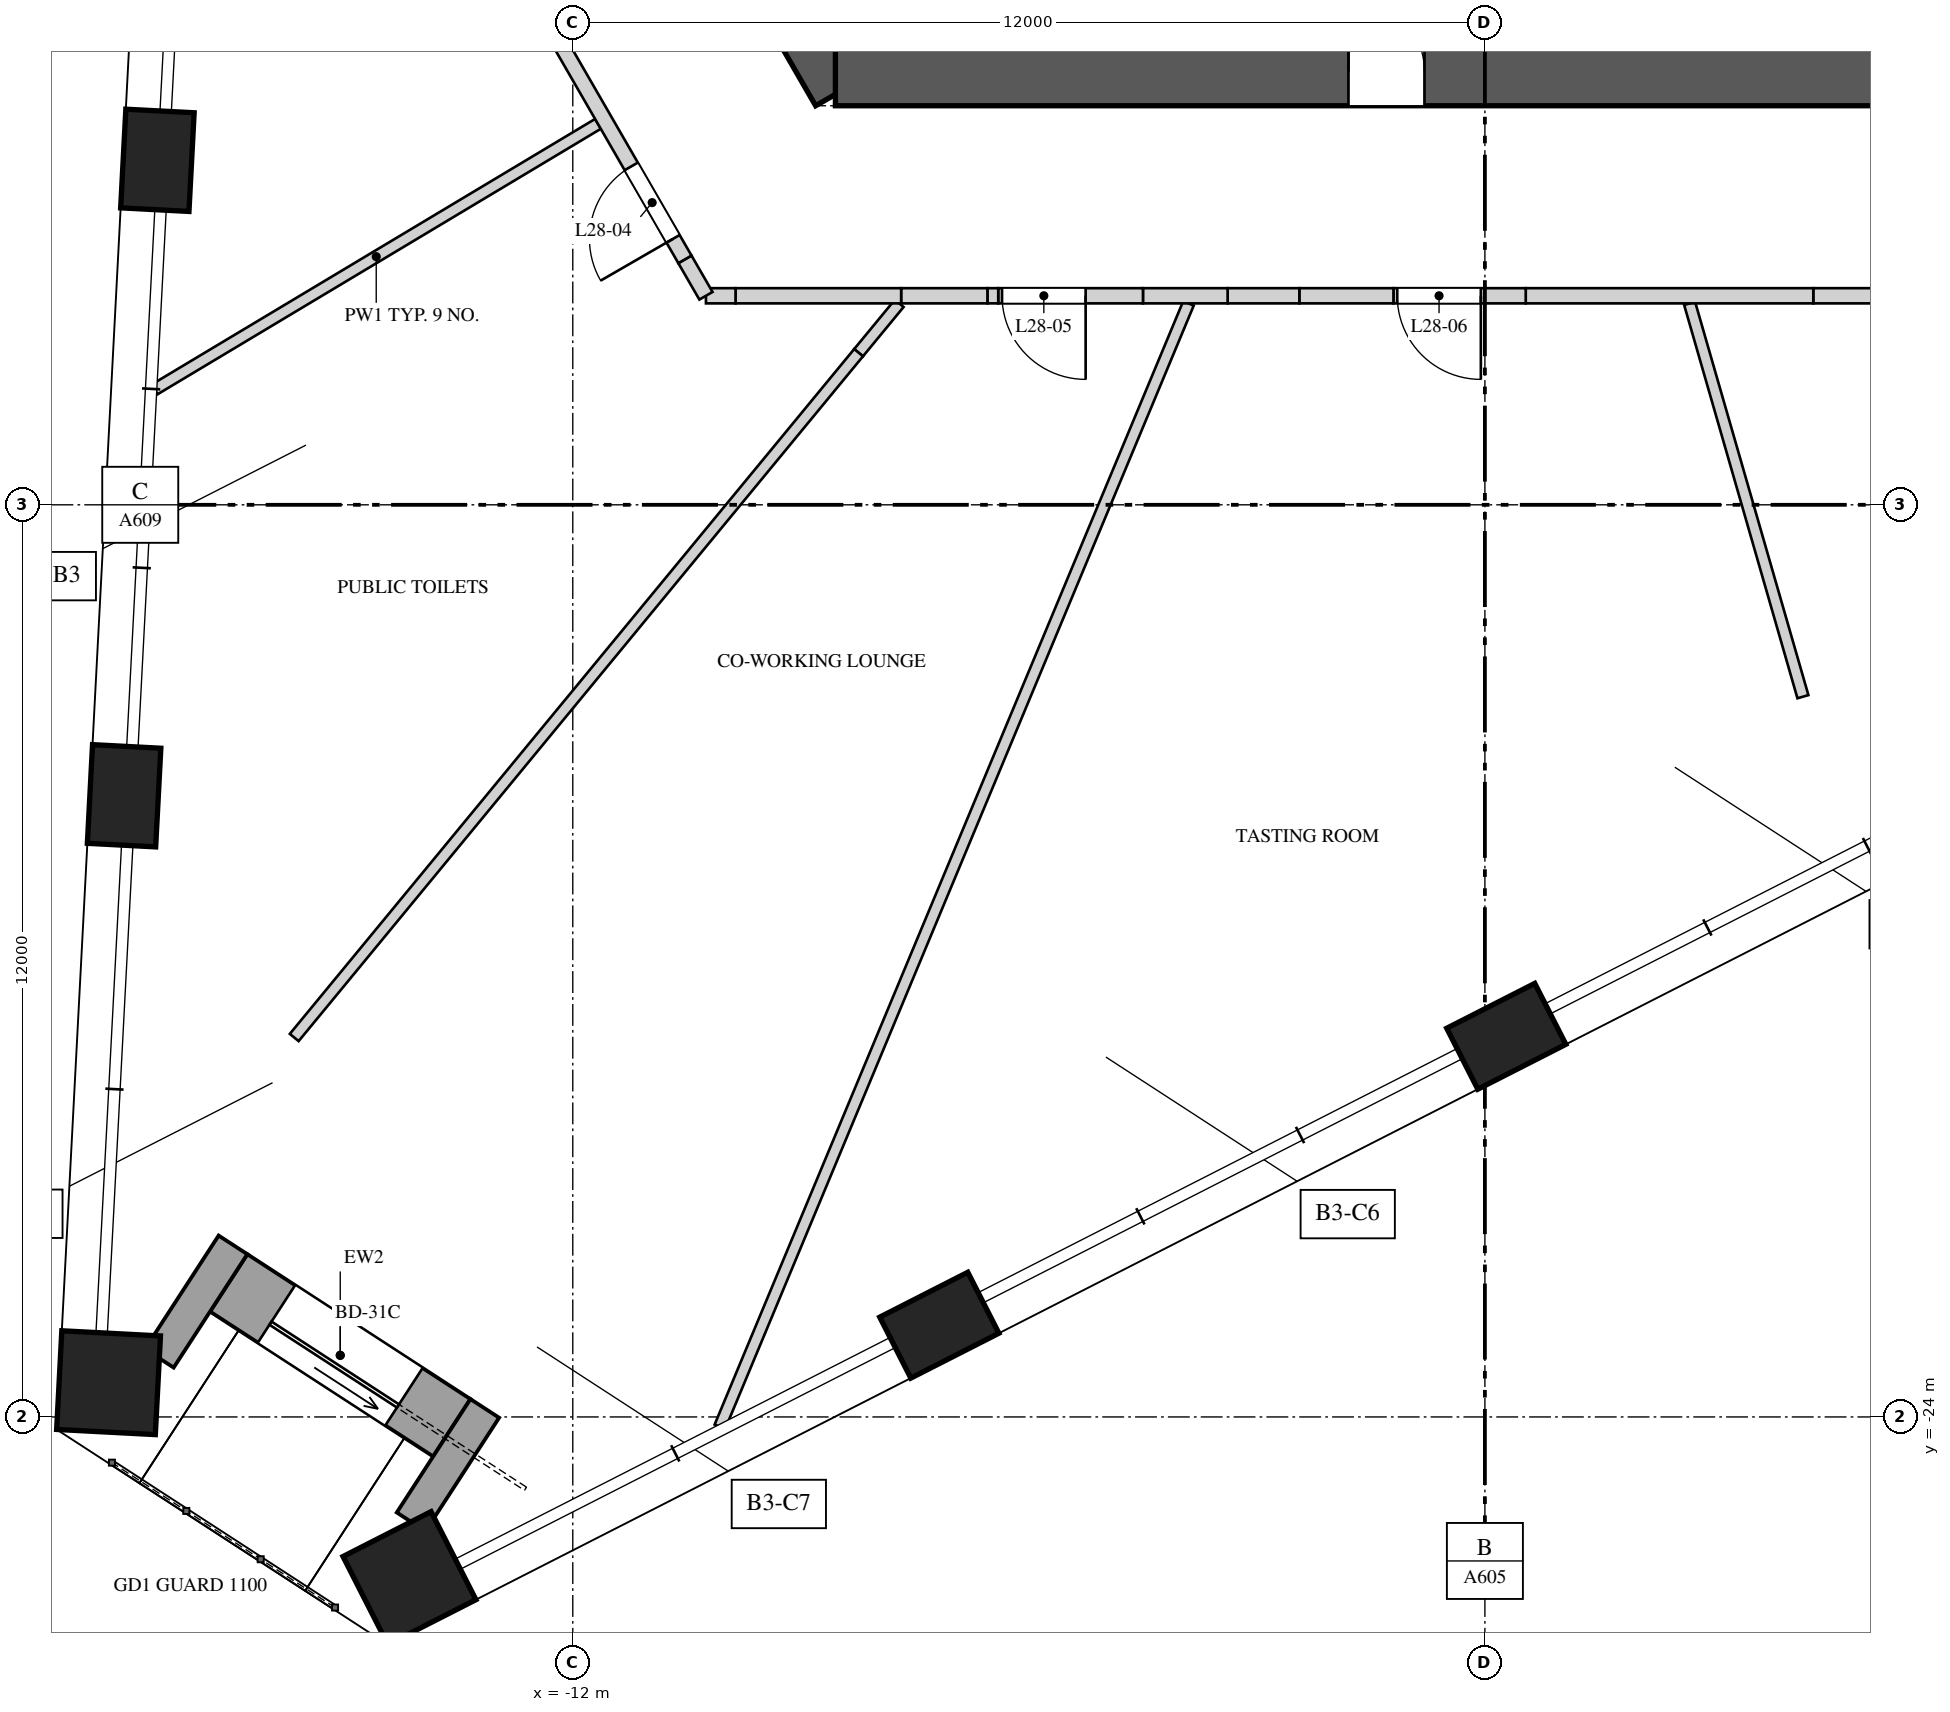
"""IFC4 building model, lengths in metres.
Left out: names, types, materials, properties, quantities, classifications, styles, units other than length and angle.
Written with IfcOpenShell. Run it as: python <this file> out.ifc"""

import sys

from ifc_helpers import new_model, si_unit, direction, frame, frame_2d, origin, origin_2d, place, context, subcontext, project, spatial, polyline, rectangle, outline, extrude, element, fill, save


model = new_model("IFC4")
c1 = context("Model", 3, precision=1e-05, world=origin(), true_north=direction((0.0, 1.0)))
c2 = subcontext(c1, "Body", "Model", "MODEL_VIEW")
j1 = project(units=[si_unit("LENGTHUNIT", "METRE"), si_unit("PLANEANGLEUNIT", "RADIAN")], contexts=[c1])
p1 = place(None, origin())
s1 = spatial("IfcSite", under=j1, at=p1, CompositionType="ELEMENT")
p2 = place(p1, origin())
s2 = spatial("IfcBuilding", under=s1, at=p2, CompositionType="ELEMENT")
p3 = place(p2, frame((0.0, 0.0, 125.6)))
s3 = spatial("IfcBuildingStorey", under=s2, at=p3, CompositionType="ELEMENT", Elevation=125.6)
p4 = place(p3, frame((-9.858, -4.025, 0.0), z_axis=(0.0, 0.0, 1.0), x_axis=(0.500059191753, -0.865991226713, 0.0)))
e1 = element("IfcWall", 1, at=p4, inside=s3, PredefinedType="SHEAR", context=c2, shape_type="SweptSolid", body=[
    extrude(rectangle(XDim=2.887, YDim=0.9, at=frame_2d((1.443, 0.0))), origin(), (0.0, 0.0, 1.0), 4.0),
])
p5 = place(p3, frame((-8.545, -6.3, 0.0), z_axis=(0.0, 0.0, 1.0), x_axis=(1.0, 0.0, 0.0)))
e2 = element("IfcWall", 2, at=p5, inside=s3, PredefinedType="SHEAR", context=c2, shape_type="SweptSolid", body=[
    extrude(rectangle(XDim=17.09, YDim=0.9, at=frame_2d((8.545, 0.0))), origin(), (0.0, 0.0, 1.0), 4.0),
])
p6 = place(p5, frame((6.75, 0.0, 0.0)))
e3 = element("IfcOpeningElement", 3, at=p6, cuts=e2, PredefinedType="OPENING", context=c2, shape_type="SweptSolid", body=[
    extrude(rectangle(XDim=1.0, YDim=2.4, at=frame_2d((0.5, 1.2))), frame((0.0, 0.46, 0.0), z_axis=(0.0, -1.0, 0.0), x_axis=(1.0, 0.0, 0.0)), (0.0, 0.0, 1.0), 0.92),
])
p7 = place(p5, frame((14.678, 0.0, 0.0)))
e4 = element("IfcOpeningElement", 4, at=p7, cuts=e2, PredefinedType="OPENING", context=c2, shape_type="SweptSolid", body=[
    extrude(rectangle(XDim=0.8, YDim=2.1, at=frame_2d((0.4, 1.05))), frame((0.0, 0.46, 0.0), z_axis=(0.0, -1.0, 0.0), x_axis=(1.0, 0.0, 0.0)), (0.0, 0.0, 1.0), 0.92),
])
for number, where, z_axis, x_axis in (
    (5, (-17.465, -7.468, -0.35), (0.0, 0.0, 1.0), (-0.052, -0.999, 0.0)),
    (6, (-17.903, -15.828, -0.35), (0.0, 0.0, 1.0), (-0.052, -0.999, 0.0)),
):
    element("IfcColumn", number, at=place(p3, frame(where, z_axis=z_axis, x_axis=x_axis)), inside=s3, PredefinedType="COLUMN", context=c2, shape_type="SweptSolid", body=[
        extrude(rectangle(XDim=1.3, YDim=0.9, at=origin_2d()), origin(), (0.0, 0.0, 1.0), 4.35),
    ])
for number, where, z_axis, x_axis in (
    (7, (-18.107, -23.549, -0.35), (0.0, 0.0, 1.0), (-0.052, -0.999, 0.0)),
    (8, (-14.148, -26.12, -0.35), (0.0, 0.0, 1.0), (0.891, 0.454, 0.0)),
):
    element("IfcColumn", number, at=place(p3, frame(where, z_axis=z_axis, x_axis=x_axis)), inside=s3, PredefinedType="COLUMN", context=c2, shape_type="SweptSolid", body=[
        extrude(rectangle(XDim=1.3, YDim=1.3, at=origin_2d()), origin(), (0.0, 0.0, 1.0), 4.35),
    ])
for number, where, z_axis, x_axis in (
    (9, (-7.178, -22.793, -0.35), (0.0, 0.0, 1.0), (0.891, 0.454, 0.0)),
    (10, (0.281, -18.992, -0.35), (0.0, 0.0, 1.0), (0.891, 0.454, 0.0)),
):
    element("IfcColumn", number, at=place(p3, frame(where, z_axis=z_axis, x_axis=x_axis)), inside=s3, PredefinedType="COLUMN", context=c2, shape_type="SweptSolid", body=[
        extrude(rectangle(XDim=1.3, YDim=0.9, at=origin_2d()), origin(), (0.0, 0.0, 1.0), 4.35),
    ])
p8 = place(p3, frame((-13.592, -24.142, 0.0), z_axis=(0.0, 0.0, 1.0), x_axis=(-0.838665071449, 0.544647498784, 0.0)))
e11 = element("IfcWall", 11, at=p8, inside=s3, PredefinedType="SOLIDWALL", context=c2, shape_type="SweptSolid", body=[
    extrude(rectangle(XDim=3.5, YDim=0.9, at=frame_2d((1.75, 0.0))), origin(), (0.0, 0.0, 1.0), 3.3),
])
p9 = place(p8, frame((0.75, 0.0, 0.0)))
e12 = element("IfcOpeningElement", 12, at=p9, cuts=e11, PredefinedType="OPENING", context=c2, shape_type="SweptSolid", body=[
    extrude(rectangle(XDim=2.0, YDim=2.4, at=frame_2d((1.0, 1.2))), frame((0.0, 0.46, 0.0), z_axis=(0.0, -1.0, 0.0), x_axis=(1.0, 0.0, 0.0)), (0.0, 0.0, 1.0), 0.92),
])
for number, where, z_axis, x_axis in (
    (13, (-14.127, -25.38, 0.0), (0.0, 0.0, 1.0), (0.545, 0.839, 0.0)),
    (14, (-17.44, -23.228, 0.0), (0.0, 0.0, 1.0), (0.545, 0.839, 0.0)),
):
    element("IfcWall", number, at=place(p3, frame(where, z_axis=z_axis, x_axis=x_axis)), inside=s3, PredefinedType="SOLIDWALL", context=c2, shape_type="SweptSolid", body=[
        extrude(rectangle(XDim=1.779, YDim=0.45, at=frame_2d((0.89, 0.0))), origin(), (0.0, 0.0, 1.0), 2.55),
    ])
p10 = place(p3, frame((-11.669, -6.989, 0.0), z_axis=(0.0, 0.0, 1.0), x_axis=(-0.857901349598, -0.513814435724, 0.0)))
e15 = element("IfcWall", 15, at=p10, inside=s3, PredefinedType="PARTITIONING", context=c2, shape_type="SweptSolid", body=[
    extrude(rectangle(XDim=6.8, YDim=0.15, at=frame_2d((3.4, 0.0))), origin(), (0.0, 0.0, 1.0), 3.65),
])
p11 = place(p3, frame((-7.705, -9.35, 0.0), z_axis=(0.0, 0.0, 1.0), x_axis=(-0.636002543614, -0.771686960183, 0.0)))
e16 = element("IfcWall", 16, at=p11, inside=s3, PredefinedType="PARTITIONING", context=c2, shape_type="SweptSolid", body=[
    extrude(rectangle(XDim=0.84, YDim=0.15, at=frame_2d((0.42, 0.0))), origin(), (0.0, 0.0, 1.0), 2.55),
])
p12 = place(p3, frame((-8.24, -9.999, 0.0), z_axis=(0.0, 0.0, 1.0), x_axis=(-0.635985012828, -0.771701408226, 0.0)))
e17 = element("IfcWall", 17, at=p12, inside=s3, PredefinedType="PARTITIONING", context=c2, shape_type="SweptSolid", body=[
    extrude(rectangle(XDim=11.675, YDim=0.15, at=frame_2d((5.837, 0.0))), origin(), (0.0, 0.0, 1.0), 3.65),
])
p13 = place(p3, frame((-3.9, -9.35, 0.0), z_axis=(0.0, 0.0, 1.0), x_axis=(-0.384954205796, -0.922935674595, 0.0)))
e18 = element("IfcWall", 18, at=p13, inside=s3, PredefinedType="PARTITIONING", context=c2, shape_type="SweptSolid", body=[
    extrude(rectangle(XDim=16.013, YDim=0.15, at=frame_2d((8.007, 0.0))), origin(), (0.0, 0.0, 1.0), 3.65),
])
p14 = place(p3, frame((2.693, -9.35, 0.0), z_axis=(0.0, 0.0, 1.0), x_axis=(0.276828214385, -0.960919424156, 0.0)))
e19 = element("IfcWall", 19, at=p14, inside=s3, PredefinedType="PARTITIONING", context=c2, shape_type="SweptSolid", body=[
    extrude(rectangle(XDim=5.385, YDim=0.15, at=frame_2d((2.692, 0.0))), origin(), (0.0, 0.0, 1.0), 3.65),
])
p15 = place(p3, frame((5.106, -9.25, 0.0), z_axis=(0.0, 0.0, 1.0), x_axis=(-1.0, 0.0, 0.0)))
e20 = element("IfcWall", 20, at=p15, inside=s3, PredefinedType="SOLIDWALL", context=c2, shape_type="SweptSolid", body=[
    extrude(rectangle(XDim=0.786, YDim=0.2, at=frame_2d((0.393, 0.0))), origin(), (0.0, 0.0, 1.0), 2.95),
])
p16 = place(p3, frame((4.32, -9.25, 0.0), z_axis=(0.0, 0.0, 1.0), x_axis=(-1.0, 0.0, 0.0)))
e21 = element("IfcWall", 21, at=p16, inside=s3, PredefinedType="SOLIDWALL", context=c2, shape_type="SweptSolid", body=[
    extrude(rectangle(XDim=3.783, YDim=0.2, at=frame_2d((1.892, 0.0))), origin(), (0.0, 0.0, 1.0), 3.65),
])
p17 = place(p3, frame((0.537, -9.25, 0.0), z_axis=(0.0, 0.0, 1.0), x_axis=(-1.0, 0.0, 0.0)))
e22 = element("IfcWall", 22, at=p17, inside=s3, PredefinedType="SOLIDWALL", context=c2, shape_type="SweptSolid", body=[
    extrude(outline(polyline([(0.0, 0.0), (1.74, 0.0), (1.74, 3.65), (0.8, 3.65), (0.8, 2.75), (0.0, 2.75), (0.0, 0.0)])), frame((0.0, 0.1, 0.0), z_axis=(0.0, -1.0, 0.0), x_axis=(1.0, 0.0, 0.0)), (0.0, 0.0, 1.0), 0.2),
])
p18 = place(p17, frame((0.59, 0.0, 0.0)))
e23 = element("IfcOpeningElement", 23, at=p18, cuts=e22, PredefinedType="OPENING", context=c2, shape_type="SweptSolid", body=[
    extrude(rectangle(XDim=1.1, YDim=2.4, at=frame_2d((0.55, 1.2))), frame((0.0, 0.11, 0.0), z_axis=(0.0, -1.0, 0.0), x_axis=(1.0, 0.0, 0.0)), (0.0, 0.0, 1.0), 0.22),
])
p19 = place(p3, frame((-1.203, -9.25, 0.0), z_axis=(0.0, 0.0, 1.0), x_axis=(-1.0, 0.0, 0.0)))
e24 = element("IfcWall", 24, at=p19, inside=s3, PredefinedType="SOLIDWALL", context=c2, shape_type="SweptSolid", body=[
    extrude(rectangle(XDim=1.238, YDim=0.2, at=frame_2d((0.619, 0.0))), origin(), (0.0, 0.0, 1.0), 3.65),
])
p20 = place(p3, frame((-2.441, -9.25, 0.0), z_axis=(0.0, 0.0, 1.0), x_axis=(-1.0, 0.0, 0.0)))
e25 = element("IfcWall", 25, at=p20, inside=s3, PredefinedType="SOLIDWALL", context=c2, shape_type="SweptSolid", body=[
    extrude(rectangle(XDim=0.944, YDim=0.2, at=frame_2d((0.472, 0.0))), origin(), (0.0, 0.0, 1.0), 2.55),
])
p21 = place(p3, frame((-3.385, -9.25, 0.0), z_axis=(0.0, 0.0, 1.0), x_axis=(-1.0, 0.0, 0.0)))
e26 = element("IfcWall", 26, at=p21, inside=s3, PredefinedType="SOLIDWALL", context=c2, shape_type="SweptSolid", body=[
    extrude(rectangle(XDim=1.114, YDim=0.2, at=frame_2d((0.557, 0.0))), origin(), (0.0, 0.0, 1.0), 3.65),
])
p22 = place(p3, frame((-4.499, -9.25, 0.0), z_axis=(0.0, 0.0, 1.0), x_axis=(-1.0, 0.0, 0.0)))
e27 = element("IfcWall", 27, at=p22, inside=s3, PredefinedType="SOLIDWALL", context=c2, shape_type="SweptSolid", body=[
    extrude(outline(polyline([(0.0, 0.0), (1.904, 0.0), (1.904, 3.65), (1.023, 3.65), (1.023, 2.55), (0.0, 2.55), (0.0, 0.0)])), frame((0.0, 0.1, 0.0), z_axis=(0.0, -1.0, 0.0), x_axis=(1.0, 0.0, 0.0)), (0.0, 0.0, 1.0), 0.2),
])
p23 = place(p22, frame((0.754, 0.0, 0.0)))
e28 = element("IfcOpeningElement", 28, at=p23, cuts=e27, PredefinedType="OPENING", context=c2, shape_type="SweptSolid", body=[
    extrude(rectangle(XDim=1.1, YDim=2.4, at=frame_2d((0.55, 1.2))), frame((0.0, 0.11, 0.0), z_axis=(0.0, -1.0, 0.0), x_axis=(1.0, 0.0, 0.0)), (0.0, 0.0, 1.0), 0.22),
])
p24 = place(p3, frame((-6.403, -9.25, 0.0), z_axis=(0.0, 0.0, 1.0), x_axis=(-1.0, 0.0, 0.0)))
e29 = element("IfcWall", 29, at=p24, inside=s3, PredefinedType="SOLIDWALL", context=c2, shape_type="SweptSolid", body=[
    extrude(rectangle(XDim=0.142, YDim=0.2, at=frame_2d((0.071, 0.0))), origin(), (0.0, 0.0, 1.0), 3.65),
])
p25 = place(p3, frame((-6.545, -9.25, 0.0), z_axis=(0.0, 0.0, 1.0), x_axis=(-1.0, 0.0, 0.0)))
e30 = element("IfcWall", 30, at=p25, inside=s3, PredefinedType="SOLIDWALL", context=c2, shape_type="SweptSolid", body=[
    extrude(rectangle(XDim=1.135, YDim=0.2, at=frame_2d((0.568, 0.0))), origin(), (0.0, 0.0, 1.0), 2.55),
])
p26 = place(p3, frame((-7.68, -9.25, 0.0), z_axis=(0.0, 0.0, 1.0), x_axis=(-1.0, 0.0, 0.0)))
e31 = element("IfcWall", 31, at=p26, inside=s3, PredefinedType="SOLIDWALL", context=c2, shape_type="SweptSolid", body=[
    extrude(rectangle(XDim=2.179, YDim=0.2, at=frame_2d((1.089, 0.0))), origin(), (0.0, 0.0, 1.0), 3.65),
])
p27 = place(p3, frame((-9.859, -9.25, 0.0), z_axis=(0.0, 0.0, 1.0), x_axis=(-1.0, 0.0, 0.0)))
e32 = element("IfcWall", 32, at=p27, inside=s3, PredefinedType="SOLIDWALL", context=c2, shape_type="SweptSolid", body=[
    extrude(rectangle(XDim=0.389, YDim=0.2, at=frame_2d((0.195, 0.0))), origin(), (0.0, 0.0, 1.0), 2.75),
])
p28 = place(p3, frame((-10.248, -9.25, 0.0), z_axis=(0.0, 0.0, 1.0), x_axis=(-0.499887958344, 0.866090081402, 0.0)))
e33 = element("IfcWall", 33, at=p28, inside=s3, PredefinedType="SOLIDWALL", context=c2, shape_type="SweptSolid", body=[
    extrude(rectangle(XDim=0.553, YDim=0.2, at=frame_2d((0.277, 0.0))), origin(), (0.0, 0.0, 1.0), 2.75),
])
p29 = place(p3, frame((-10.525, -8.771, 0.0), z_axis=(0.0, 0.0, 1.0), x_axis=(-0.500031425827, 0.866007259314, 0.0)))
e34 = element("IfcWall", 34, at=p29, inside=s3, PredefinedType="SOLIDWALL", context=c2, shape_type="SweptSolid", body=[
    extrude(rectangle(XDim=3.602, YDim=0.2, at=frame_2d((1.801, 0.0))), origin(), (0.0, 0.0, 1.0), 3.65),
])
p30 = place(p29, frame((0.312, 0.0, 0.0)))
e35 = element("IfcOpeningElement", 35, at=p30, cuts=e34, PredefinedType="OPENING", context=c2, shape_type="SweptSolid", body=[
    extrude(rectangle(XDim=1.1, YDim=2.4, at=frame_2d((0.55, 1.2))), frame((0.0, 0.11, 0.0), z_axis=(0.0, -1.0, 0.0), x_axis=(1.0, 0.0, 0.0)), (0.0, 0.0, 1.0), 0.22),
])
p31 = place(p9, origin())
e36 = element("IfcDoor", 36, at=p31, inside=s3, OperationType="SLIDING_TO_LEFT", PredefinedType="DOOR", context=c2, shape_type="SweptSolid", body=[
    extrude(rectangle(XDim=2.0, YDim=2.4, at=frame_2d((1.0, 1.2))), frame((0.0, 0.025, 0.0), z_axis=(0.0, -1.0, 0.0), x_axis=(1.0, 0.0, 0.0)), (0.0, 0.0, 1.0), 0.05),
])
fill(e12, e36)
p32 = place(p6, origin())
e37 = element("IfcDoor", 37, at=p32, inside=s3, OperationType="SINGLE_SWING_LEFT", PredefinedType="DOOR", context=c2, shape_type="SweptSolid", body=[
    extrude(rectangle(XDim=1.0, YDim=2.4, at=frame_2d((0.5, 1.2))), frame((0.0, 0.025, 0.0), z_axis=(0.0, -1.0, 0.0), x_axis=(1.0, 0.0, 0.0)), (0.0, 0.0, 1.0), 0.05),
])
fill(e3, e37)
p33 = place(p30, origin())
e38 = element("IfcDoor", 38, at=p33, inside=s3, OperationType="SINGLE_SWING_RIGHT", PredefinedType="DOOR", context=c2, shape_type="SweptSolid", body=[
    extrude(rectangle(XDim=1.1, YDim=2.4, at=frame_2d((0.55, 1.2))), frame((0.0, 0.025, 0.0), z_axis=(0.0, -1.0, 0.0), x_axis=(1.0, 0.0, 0.0)), (0.0, 0.0, 1.0), 0.05),
])
fill(e35, e38)
p34 = place(p23, origin())
e39 = element("IfcDoor", 39, at=p34, inside=s3, OperationType="SINGLE_SWING_LEFT", PredefinedType="DOOR", context=c2, shape_type="SweptSolid", body=[
    extrude(rectangle(XDim=1.1, YDim=2.4, at=frame_2d((0.55, 1.2))), frame((0.0, 0.025, 0.0), z_axis=(0.0, -1.0, 0.0), x_axis=(1.0, 0.0, 0.0)), (0.0, 0.0, 1.0), 0.05),
])
fill(e28, e39)
p35 = place(p18, origin())
e40 = element("IfcDoor", 40, at=p35, inside=s3, OperationType="SINGLE_SWING_RIGHT", PredefinedType="DOOR", context=c2, shape_type="SweptSolid", body=[
    extrude(rectangle(XDim=1.1, YDim=2.4, at=frame_2d((0.55, 1.2))), frame((0.0, 0.025, 0.0), z_axis=(0.0, -1.0, 0.0), x_axis=(1.0, 0.0, 0.0)), (0.0, 0.0, 1.0), 0.05),
])
fill(e23, e40)
save(model, sys.argv[1])
